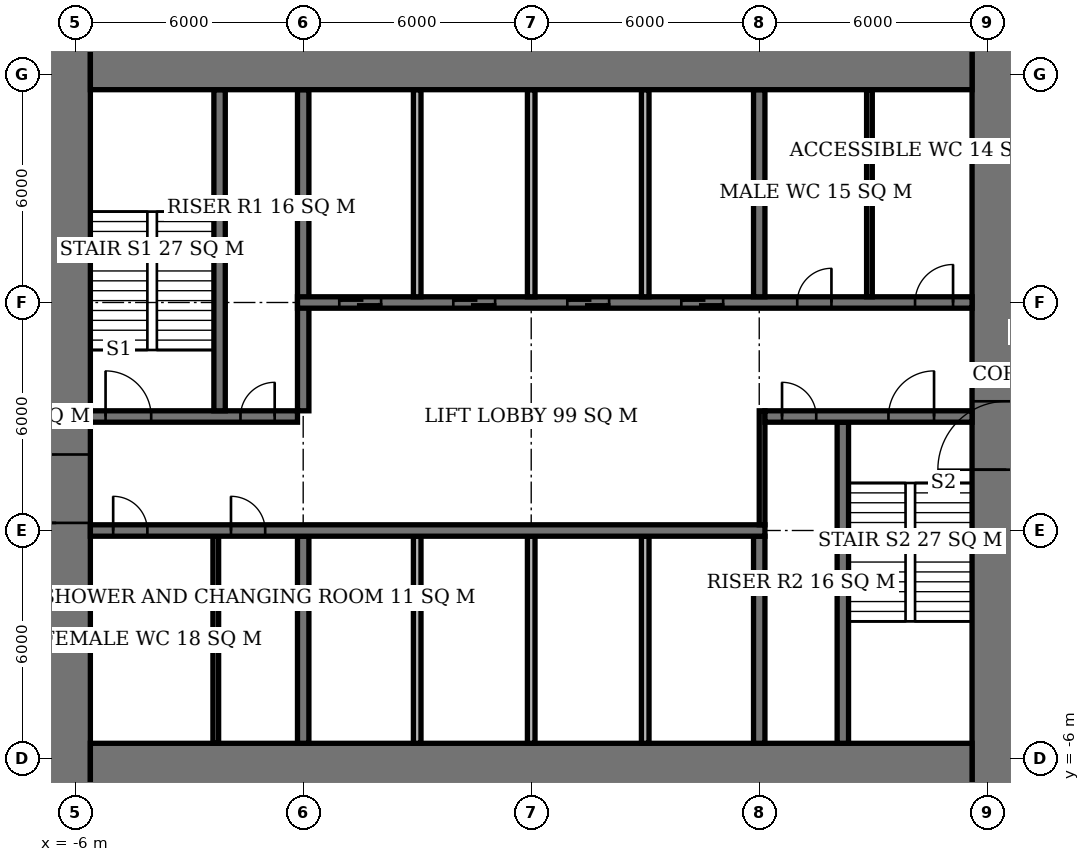
"""IFC4 building model, lengths in metres.
Left out: names, types, materials, properties, quantities, classifications, styles, units other than length and angle.
Written with IfcOpenShell. Run it as: python <this file> out.ifc"""

import sys

from ifc_helpers import new_model, si_unit, direction, frame, frame_2d, origin, place, context, subcontext, project, spatial, rectangle, extrude, element, fill, save


model = new_model("IFC4")
c1 = context("Model", 3, precision=1e-05, world=origin(), true_north=direction((0.0, 1.0)))
c2 = subcontext(c1, "Body", "Model", "MODEL_VIEW")
j1 = project(units=[si_unit("LENGTHUNIT", "METRE"), si_unit("PLANEANGLEUNIT", "RADIAN")], contexts=[c1])
p1 = place(None, origin())
s1 = spatial("IfcSite", under=j1, at=p1, CompositionType="ELEMENT")
p2 = place(p1, origin())
s2 = spatial("IfcBuilding", under=s1, at=p2, CompositionType="ELEMENT")
p3 = place(p2, frame((0.0, 0.0, 6.0)))
s3 = spatial("IfcBuildingStorey", under=s2, at=p3, CompositionType="ELEMENT", Elevation=6.0)
for number, where, z_axis, x_axis in (
    (1, (-5.6, -6.6, 0.0), (0.0, 0.0, 1.0), (1.0, 0.0, 0.0)),
    (2, (-5.6, 12.6, 0.0), (0.0, 0.0, 1.0), (1.0, 0.0, 0.0)),
):
    element("IfcWall", number, at=place(p3, frame(where, z_axis=z_axis, x_axis=x_axis)), inside=s3, PredefinedType="SHEAR", context=c2, shape_type="SweptSolid", body=[
        extrude(rectangle(XDim=23.2, YDim=2.0, at=frame_2d((11.6, 0.0))), origin(), (0.0, 0.0, 1.0), 5.0),
    ])
p4 = place(p3, frame((-6.5, -7.6, 0.0), z_axis=(0.0, 0.0, 1.0), x_axis=(0.0, 1.0, 0.0)))
e3 = element("IfcWall", 3, at=p4, inside=s3, PredefinedType="SHEAR", context=c2, shape_type="SweptSolid", body=[
    extrude(rectangle(XDim=21.2, YDim=1.8, at=frame_2d((10.6, 0.0))), origin(), (0.0, 0.0, 1.0), 5.0),
])
p5 = place(p4, frame((7.8, 0.0, 0.0)))
e4 = element("IfcOpeningElement", 4, at=p5, cuts=e3, PredefinedType="OPENING", context=c2, shape_type="SweptSolid", body=[
    extrude(rectangle(XDim=1.8, YDim=2.4, at=frame_2d((0.9, 1.2))), frame((0.0, 0.91, 0.0), z_axis=(0.0, -1.0, 0.0), x_axis=(1.0, 0.0, 0.0)), (0.0, 0.0, 1.0), 1.82),
])
p6 = place(p3, frame((18.5, -7.6, 0.0), z_axis=(0.0, 0.0, 1.0), x_axis=(0.0, 1.0, 0.0)))
e5 = element("IfcWall", 5, at=p6, inside=s3, PredefinedType="SHEAR", context=c2, shape_type="SweptSolid", body=[
    extrude(rectangle(XDim=21.2, YDim=1.8, at=frame_2d((10.6, 0.0))), origin(), (0.0, 0.0, 1.0), 5.0),
])
p7 = place(p6, frame((9.2, 0.0, 0.0)))
e6 = element("IfcOpeningElement", 6, at=p7, cuts=e5, PredefinedType="OPENING", context=c2, shape_type="SweptSolid", body=[
    extrude(rectangle(XDim=1.8, YDim=2.4, at=frame_2d((0.9, 1.2))), frame((0.0, 0.91, 0.0), z_axis=(0.0, -1.0, 0.0), x_axis=(1.0, 0.0, 0.0)), (0.0, 0.0, 1.0), 1.82),
])
p8 = place(p3, frame((-5.6, 0.0, 0.0), z_axis=(0.0, 0.0, 1.0), x_axis=(1.0, 0.0, 0.0)))
e7 = element("IfcWall", 7, at=p8, inside=s3, PredefinedType="SHEAR", context=c2, shape_type="SweptSolid", body=[
    extrude(rectangle(XDim=17.75, YDim=0.3, at=frame_2d((8.875, 0.0))), origin(), (0.0, 0.0, 1.0), 5.0),
])
p9 = place(p8, frame((0.6, 0.0, 0.0)))
e8 = element("IfcOpeningElement", 8, at=p9, cuts=e7, PredefinedType="OPENING", context=c2, shape_type="SweptSolid", body=[
    extrude(rectangle(XDim=0.9, YDim=2.1, at=frame_2d((0.45, 1.05))), frame((0.0, 0.16, 0.0), z_axis=(0.0, -1.0, 0.0), x_axis=(1.0, 0.0, 0.0)), (0.0, 0.0, 1.0), 0.32),
])
p10 = place(p8, frame((3.7, 0.0, 0.0)))
e9 = element("IfcOpeningElement", 9, at=p10, cuts=e7, PredefinedType="OPENING", context=c2, shape_type="SweptSolid", body=[
    extrude(rectangle(XDim=0.9, YDim=2.1, at=frame_2d((0.45, 1.05))), frame((0.0, 0.16, 0.0), z_axis=(0.0, -1.0, 0.0), x_axis=(1.0, 0.0, 0.0)), (0.0, 0.0, 1.0), 0.32),
])
p11 = place(p3, frame((-5.6, 3.0, 0.0), z_axis=(0.0, 0.0, 1.0), x_axis=(1.0, 0.0, 0.0)))
e10 = element("IfcWall", 10, at=p11, inside=s3, PredefinedType="SHEAR", context=c2, shape_type="SweptSolid", body=[
    extrude(rectangle(XDim=5.45, YDim=0.3, at=frame_2d((2.725, 0.0))), origin(), (0.0, 0.0, 1.0), 5.0),
])
p12 = place(p11, frame((0.4, 0.0, 0.0)))
e11 = element("IfcOpeningElement", 11, at=p12, cuts=e10, PredefinedType="OPENING", context=c2, shape_type="SweptSolid", body=[
    extrude(rectangle(XDim=1.2, YDim=2.1, at=frame_2d((0.6, 1.05))), frame((0.0, 0.16, 0.0), z_axis=(0.0, -1.0, 0.0), x_axis=(1.0, 0.0, 0.0)), (0.0, 0.0, 1.0), 0.32),
])
p13 = place(p11, frame((3.95, 0.0, 0.0)))
e12 = element("IfcOpeningElement", 12, at=p13, cuts=e10, PredefinedType="OPENING", context=c2, shape_type="SweptSolid", body=[
    extrude(rectangle(XDim=0.9, YDim=2.1, at=frame_2d((0.45, 1.05))), frame((0.0, 0.16, 0.0), z_axis=(0.0, -1.0, 0.0), x_axis=(1.0, 0.0, 0.0)), (0.0, 0.0, 1.0), 0.32),
])
p14 = place(p3, frame((12.15, 3.0, 0.0), z_axis=(0.0, 0.0, 1.0), x_axis=(1.0, 0.0, 0.0)))
e13 = element("IfcWall", 13, at=p14, inside=s3, PredefinedType="SHEAR", context=c2, shape_type="SweptSolid", body=[
    extrude(rectangle(XDim=5.45, YDim=0.3, at=frame_2d((2.725, 0.0))), origin(), (0.0, 0.0, 1.0), 5.0),
])
p15 = place(p14, frame((3.25, 0.0, 0.0)))
e14 = element("IfcOpeningElement", 14, at=p15, cuts=e13, PredefinedType="OPENING", context=c2, shape_type="SweptSolid", body=[
    extrude(rectangle(XDim=1.2, YDim=2.1, at=frame_2d((0.6, 1.05))), frame((0.0, 0.16, 0.0), z_axis=(0.0, -1.0, 0.0), x_axis=(1.0, 0.0, 0.0)), (0.0, 0.0, 1.0), 0.32),
])
p16 = place(p14, frame((0.45, 0.0, 0.0)))
e15 = element("IfcOpeningElement", 15, at=p16, cuts=e13, PredefinedType="OPENING", context=c2, shape_type="SweptSolid", body=[
    extrude(rectangle(XDim=0.9, YDim=2.1, at=frame_2d((0.45, 1.05))), frame((0.0, 0.16, 0.0), z_axis=(0.0, -1.0, 0.0), x_axis=(1.0, 0.0, 0.0)), (0.0, 0.0, 1.0), 0.32),
])
p17 = place(p3, frame((-0.15, 6.0, 0.0), z_axis=(0.0, 0.0, 1.0), x_axis=(1.0, 0.0, 0.0)))
e16 = element("IfcWall", 16, at=p17, inside=s3, PredefinedType="SHEAR", context=c2, shape_type="SweptSolid", body=[
    extrude(rectangle(XDim=17.75, YDim=0.3, at=frame_2d((8.875, 0.0))), origin(), (0.0, 0.0, 1.0), 5.0),
])
p18 = place(p17, frame((13.15, 0.0, 0.0)))
e17 = element("IfcOpeningElement", 17, at=p18, cuts=e16, PredefinedType="OPENING", context=c2, shape_type="SweptSolid", body=[
    extrude(rectangle(XDim=0.9, YDim=2.1, at=frame_2d((0.45, 1.05))), frame((0.0, 0.16, 0.0), z_axis=(0.0, -1.0, 0.0), x_axis=(1.0, 0.0, 0.0)), (0.0, 0.0, 1.0), 0.32),
])
p19 = place(p17, frame((16.25, 0.0, 0.0)))
e18 = element("IfcOpeningElement", 18, at=p19, cuts=e16, PredefinedType="OPENING", context=c2, shape_type="SweptSolid", body=[
    extrude(rectangle(XDim=1.0, YDim=2.1, at=frame_2d((0.5, 1.05))), frame((0.0, 0.16, 0.0), z_axis=(0.0, -1.0, 0.0), x_axis=(1.0, 0.0, 0.0)), (0.0, 0.0, 1.0), 0.32),
])
p20 = place(p17, frame((1.1, 0.0, 0.0)))
e19 = element("IfcOpeningElement", 19, at=p20, cuts=e16, PredefinedType="OPENING", context=c2, shape_type="SweptSolid", body=[
    extrude(rectangle(XDim=1.1, YDim=2.1, at=frame_2d((0.55, 1.05))), frame((0.0, 0.16, 0.0), z_axis=(0.0, -1.0, 0.0), x_axis=(1.0, 0.0, 0.0)), (0.0, 0.0, 1.0), 0.32),
])
p21 = place(p17, frame((4.1, 0.0, 0.0)))
e20 = element("IfcOpeningElement", 20, at=p21, cuts=e16, PredefinedType="OPENING", context=c2, shape_type="SweptSolid", body=[
    extrude(rectangle(XDim=1.1, YDim=2.1, at=frame_2d((0.55, 1.05))), frame((0.0, 0.16, 0.0), z_axis=(0.0, -1.0, 0.0), x_axis=(1.0, 0.0, 0.0)), (0.0, 0.0, 1.0), 0.32),
])
p22 = place(p17, frame((7.1, 0.0, 0.0)))
e21 = element("IfcOpeningElement", 21, at=p22, cuts=e16, PredefinedType="OPENING", context=c2, shape_type="SweptSolid", body=[
    extrude(rectangle(XDim=1.1, YDim=2.1, at=frame_2d((0.55, 1.05))), frame((0.0, 0.16, 0.0), z_axis=(0.0, -1.0, 0.0), x_axis=(1.0, 0.0, 0.0)), (0.0, 0.0, 1.0), 0.32),
])
p23 = place(p17, frame((10.1, 0.0, 0.0)))
e22 = element("IfcOpeningElement", 22, at=p23, cuts=e16, PredefinedType="OPENING", context=c2, shape_type="SweptSolid", body=[
    extrude(rectangle(XDim=1.1, YDim=2.1, at=frame_2d((0.55, 1.05))), frame((0.0, 0.16, 0.0), z_axis=(0.0, -1.0, 0.0), x_axis=(1.0, 0.0, 0.0)), (0.0, 0.0, 1.0), 0.32),
])
p24 = place(p3, frame((0.0, -5.6, 0.0), z_axis=(0.0, 0.0, 1.0), x_axis=(0.0, 1.0, 0.0)))
e23 = element("IfcWall", 23, at=p24, inside=s3, PredefinedType="SHEAR", context=c2, shape_type="SweptSolid", body=[
    extrude(rectangle(XDim=5.45, YDim=0.3, at=frame_2d((2.725, 0.0))), origin(), (0.0, 0.0, 1.0), 5.0),
])
p25 = place(p3, frame((0.0, 3.15, 0.0), z_axis=(0.0, 0.0, 1.0), x_axis=(0.0, 1.0, 0.0)))
e24 = element("IfcWall", 24, at=p25, inside=s3, PredefinedType="SHEAR", context=c2, shape_type="SweptSolid", body=[
    extrude(rectangle(XDim=8.45, YDim=0.3, at=frame_2d((4.225, 0.0))), origin(), (0.0, 0.0, 1.0), 5.0),
])
for number, where, z_axis, x_axis in (
    (25, (12.0, -5.6, 0.0), (0.0, 0.0, 1.0), (0.0, 1.0, 0.0)),
    (26, (12.0, 6.15, 0.0), (0.0, 0.0, 1.0), (0.0, 1.0, 0.0)),
):
    element("IfcWall", number, at=place(p3, frame(where, z_axis=z_axis, x_axis=x_axis)), inside=s3, PredefinedType="SHEAR", context=c2, shape_type="SweptSolid", body=[
        extrude(rectangle(XDim=5.45, YDim=0.3, at=frame_2d((2.725, 0.0))), origin(), (0.0, 0.0, 1.0), 5.0),
    ])
for number, where, z_axis, x_axis in (
    (27, (-2.2, 3.15, 0.0), (0.0, 0.0, 1.0), (0.0, 1.0, 0.0)),
    (28, (14.2, -5.6, 0.0), (0.0, 0.0, 1.0), (0.0, 1.0, 0.0)),
):
    element("IfcWall", number, at=place(p3, frame(where, z_axis=z_axis, x_axis=x_axis)), inside=s3, PredefinedType="SHEAR", context=c2, shape_type="SweptSolid", body=[
        extrude(rectangle(XDim=8.45, YDim=0.3, at=frame_2d((4.225, 0.0))), origin(), (0.0, 0.0, 1.0), 5.0),
    ])
for number, where, z_axis, x_axis in (
    (29, (3.0, 6.15, 0.0), (0.0, 0.0, 1.0), (0.0, 1.0, 0.0)),
    (30, (6.0, 6.15, 0.0), (0.0, 0.0, 1.0), (0.0, 1.0, 0.0)),
    (31, (9.0, 6.15, 0.0), (0.0, 0.0, 1.0), (0.0, 1.0, 0.0)),
    (32, (3.0, -5.6, 0.0), (0.0, 0.0, 1.0), (0.0, 1.0, 0.0)),
    (33, (6.0, -5.6, 0.0), (0.0, 0.0, 1.0), (0.0, 1.0, 0.0)),
    (34, (9.0, -5.6, 0.0), (0.0, 0.0, 1.0), (0.0, 1.0, 0.0)),
):
    element("IfcWall", number, at=place(p3, frame(where, z_axis=z_axis, x_axis=x_axis)), inside=s3, PredefinedType="SOLIDWALL", context=c2, shape_type="SweptSolid", body=[
        extrude(rectangle(XDim=5.45, YDim=0.2, at=frame_2d((2.725, 0.0))), origin(), (0.0, 0.0, 1.0), 5.0),
    ])
for number, where, z_axis, x_axis in (
    (35, (-2.3, -5.6, 0.0), (0.0, 0.0, 1.0), (0.0, 1.0, 0.0)),
    (36, (14.9, 6.15, 0.0), (0.0, 0.0, 1.0), (0.0, 1.0, 0.0)),
):
    element("IfcWall", number, at=place(p3, frame(where, z_axis=z_axis, x_axis=x_axis)), inside=s3, PredefinedType="PLUMBINGWALL", context=c2, shape_type="SweptSolid", body=[
        extrude(rectangle(XDim=5.45, YDim=0.15, at=frame_2d((2.725, 0.0))), origin(), (0.0, 0.0, 1.0), 4.75),
    ])
p26 = place(p3, frame((12.075, 0.15, 0.0), z_axis=(0.0, 0.0, 1.0), x_axis=(0.0, 1.0, 0.0)))
e37 = element("IfcWall", 37, at=p26, inside=s3, PredefinedType="PARTITIONING", context=c2, shape_type="SweptSolid", body=[
    extrude(rectangle(XDim=3.0, YDim=0.15, at=frame_2d((1.5, 0.0))), origin(), (0.0, 0.0, 1.0), 4.75),
])
p27 = place(p5, origin())
e38 = element("IfcDoor", 38, at=p27, inside=s3, OperationType="DOUBLE_DOOR_SINGLE_SWING", PredefinedType="DOOR", context=c2, shape_type="SweptSolid", body=[
    extrude(rectangle(XDim=1.8, YDim=2.4, at=frame_2d((0.9, 1.2))), frame((0.0, 0.025, 0.0), z_axis=(0.0, -1.0, 0.0), x_axis=(1.0, 0.0, 0.0)), (0.0, 0.0, 1.0), 0.05),
])
fill(e4, e38)
p28 = place(p7, origin())
e39 = element("IfcDoor", 39, at=p28, inside=s3, OperationType="DOUBLE_DOOR_SINGLE_SWING", PredefinedType="DOOR", context=c2, shape_type="SweptSolid", body=[
    extrude(rectangle(XDim=1.8, YDim=2.4, at=frame_2d((0.9, 1.2))), frame((0.0, 0.025, 0.0), z_axis=(0.0, -1.0, 0.0), x_axis=(1.0, 0.0, 0.0)), (0.0, 0.0, 1.0), 0.05),
])
fill(e6, e39)
p29 = place(p12, origin())
e40 = element("IfcDoor", 40, at=p29, inside=s3, OperationType="SINGLE_SWING_LEFT", PredefinedType="DOOR", context=c2, shape_type="SweptSolid", body=[
    extrude(rectangle(XDim=1.2, YDim=2.1, at=frame_2d((0.6, 1.05))), frame((0.0, 0.025, 0.0), z_axis=(0.0, -1.0, 0.0), x_axis=(1.0, 0.0, 0.0)), (0.0, 0.0, 1.0), 0.05),
])
fill(e11, e40)
p30 = place(p13, origin())
e41 = element("IfcDoor", 41, at=p30, inside=s3, OperationType="SINGLE_SWING_RIGHT", PredefinedType="DOOR", context=c2, shape_type="SweptSolid", body=[
    extrude(rectangle(XDim=0.9, YDim=2.1, at=frame_2d((0.45, 1.05))), frame((0.0, 0.025, 0.0), z_axis=(0.0, -1.0, 0.0), x_axis=(1.0, 0.0, 0.0)), (0.0, 0.0, 1.0), 0.05),
])
fill(e12, e41)
p31 = place(p15, origin())
e42 = element("IfcDoor", 42, at=p31, inside=s3, OperationType="SINGLE_SWING_RIGHT", PredefinedType="DOOR", context=c2, shape_type="SweptSolid", body=[
    extrude(rectangle(XDim=1.2, YDim=2.1, at=frame_2d((0.6, 1.05))), frame((0.0, 0.025, 0.0), z_axis=(0.0, -1.0, 0.0), x_axis=(1.0, 0.0, 0.0)), (0.0, 0.0, 1.0), 0.05),
])
fill(e14, e42)
p32 = place(p16, origin())
e43 = element("IfcDoor", 43, at=p32, inside=s3, OperationType="SINGLE_SWING_LEFT", PredefinedType="DOOR", context=c2, shape_type="SweptSolid", body=[
    extrude(rectangle(XDim=0.9, YDim=2.1, at=frame_2d((0.45, 1.05))), frame((0.0, 0.025, 0.0), z_axis=(0.0, -1.0, 0.0), x_axis=(1.0, 0.0, 0.0)), (0.0, 0.0, 1.0), 0.05),
])
fill(e15, e43)
p33 = place(p9, origin())
e44 = element("IfcDoor", 44, at=p33, inside=s3, OperationType="SINGLE_SWING_LEFT", PredefinedType="DOOR", context=c2, shape_type="SweptSolid", body=[
    extrude(rectangle(XDim=0.9, YDim=2.1, at=frame_2d((0.45, 1.05))), frame((0.0, 0.025, 0.0), z_axis=(0.0, -1.0, 0.0), x_axis=(1.0, 0.0, 0.0)), (0.0, 0.0, 1.0), 0.05),
])
fill(e8, e44)
p34 = place(p10, origin())
e45 = element("IfcDoor", 45, at=p34, inside=s3, OperationType="SINGLE_SWING_LEFT", PredefinedType="DOOR", context=c2, shape_type="SweptSolid", body=[
    extrude(rectangle(XDim=0.9, YDim=2.1, at=frame_2d((0.45, 1.05))), frame((0.0, 0.025, 0.0), z_axis=(0.0, -1.0, 0.0), x_axis=(1.0, 0.0, 0.0)), (0.0, 0.0, 1.0), 0.05),
])
fill(e9, e45)
p35 = place(p18, origin())
e46 = element("IfcDoor", 46, at=p35, inside=s3, OperationType="SINGLE_SWING_RIGHT", PredefinedType="DOOR", context=c2, shape_type="SweptSolid", body=[
    extrude(rectangle(XDim=0.9, YDim=2.1, at=frame_2d((0.45, 1.05))), frame((0.0, 0.025, 0.0), z_axis=(0.0, -1.0, 0.0), x_axis=(1.0, 0.0, 0.0)), (0.0, 0.0, 1.0), 0.05),
])
fill(e17, e46)
p36 = place(p19, origin())
e47 = element("IfcDoor", 47, at=p36, inside=s3, OperationType="SINGLE_SWING_RIGHT", PredefinedType="DOOR", context=c2, shape_type="SweptSolid", body=[
    extrude(rectangle(XDim=1.0, YDim=2.1, at=frame_2d((0.5, 1.05))), frame((0.0, 0.025, 0.0), z_axis=(0.0, -1.0, 0.0), x_axis=(1.0, 0.0, 0.0)), (0.0, 0.0, 1.0), 0.05),
])
fill(e18, e47)
p37 = place(p20, origin())
e48 = element("IfcDoor", 48, at=p37, inside=s3, OperationType="DOUBLE_DOOR_SLIDING", PredefinedType="USERDEFINED", context=c2, shape_type="SweptSolid", body=[
    extrude(rectangle(XDim=1.1, YDim=2.1, at=frame_2d((0.55, 1.05))), frame((0.0, 0.025, 0.0), z_axis=(0.0, -1.0, 0.0), x_axis=(1.0, 0.0, 0.0)), (0.0, 0.0, 1.0), 0.05),
])
fill(e19, e48)
p38 = place(p21, origin())
e49 = element("IfcDoor", 49, at=p38, inside=s3, OperationType="DOUBLE_DOOR_SLIDING", PredefinedType="USERDEFINED", context=c2, shape_type="SweptSolid", body=[
    extrude(rectangle(XDim=1.1, YDim=2.1, at=frame_2d((0.55, 1.05))), frame((0.0, 0.025, 0.0), z_axis=(0.0, -1.0, 0.0), x_axis=(1.0, 0.0, 0.0)), (0.0, 0.0, 1.0), 0.05),
])
fill(e20, e49)
p39 = place(p22, origin())
e50 = element("IfcDoor", 50, at=p39, inside=s3, OperationType="DOUBLE_DOOR_SLIDING", PredefinedType="USERDEFINED", context=c2, shape_type="SweptSolid", body=[
    extrude(rectangle(XDim=1.1, YDim=2.1, at=frame_2d((0.55, 1.05))), frame((0.0, 0.025, 0.0), z_axis=(0.0, -1.0, 0.0), x_axis=(1.0, 0.0, 0.0)), (0.0, 0.0, 1.0), 0.05),
])
fill(e21, e50)
p40 = place(p23, origin())
e51 = element("IfcDoor", 51, at=p40, inside=s3, OperationType="DOUBLE_DOOR_SLIDING", PredefinedType="USERDEFINED", context=c2, shape_type="SweptSolid", body=[
    extrude(rectangle(XDim=1.1, YDim=2.1, at=frame_2d((0.55, 1.05))), frame((0.0, 0.025, 0.0), z_axis=(0.0, -1.0, 0.0), x_axis=(1.0, 0.0, 0.0)), (0.0, 0.0, 1.0), 0.05),
])
fill(e22, e51)
save(model, sys.argv[1])
